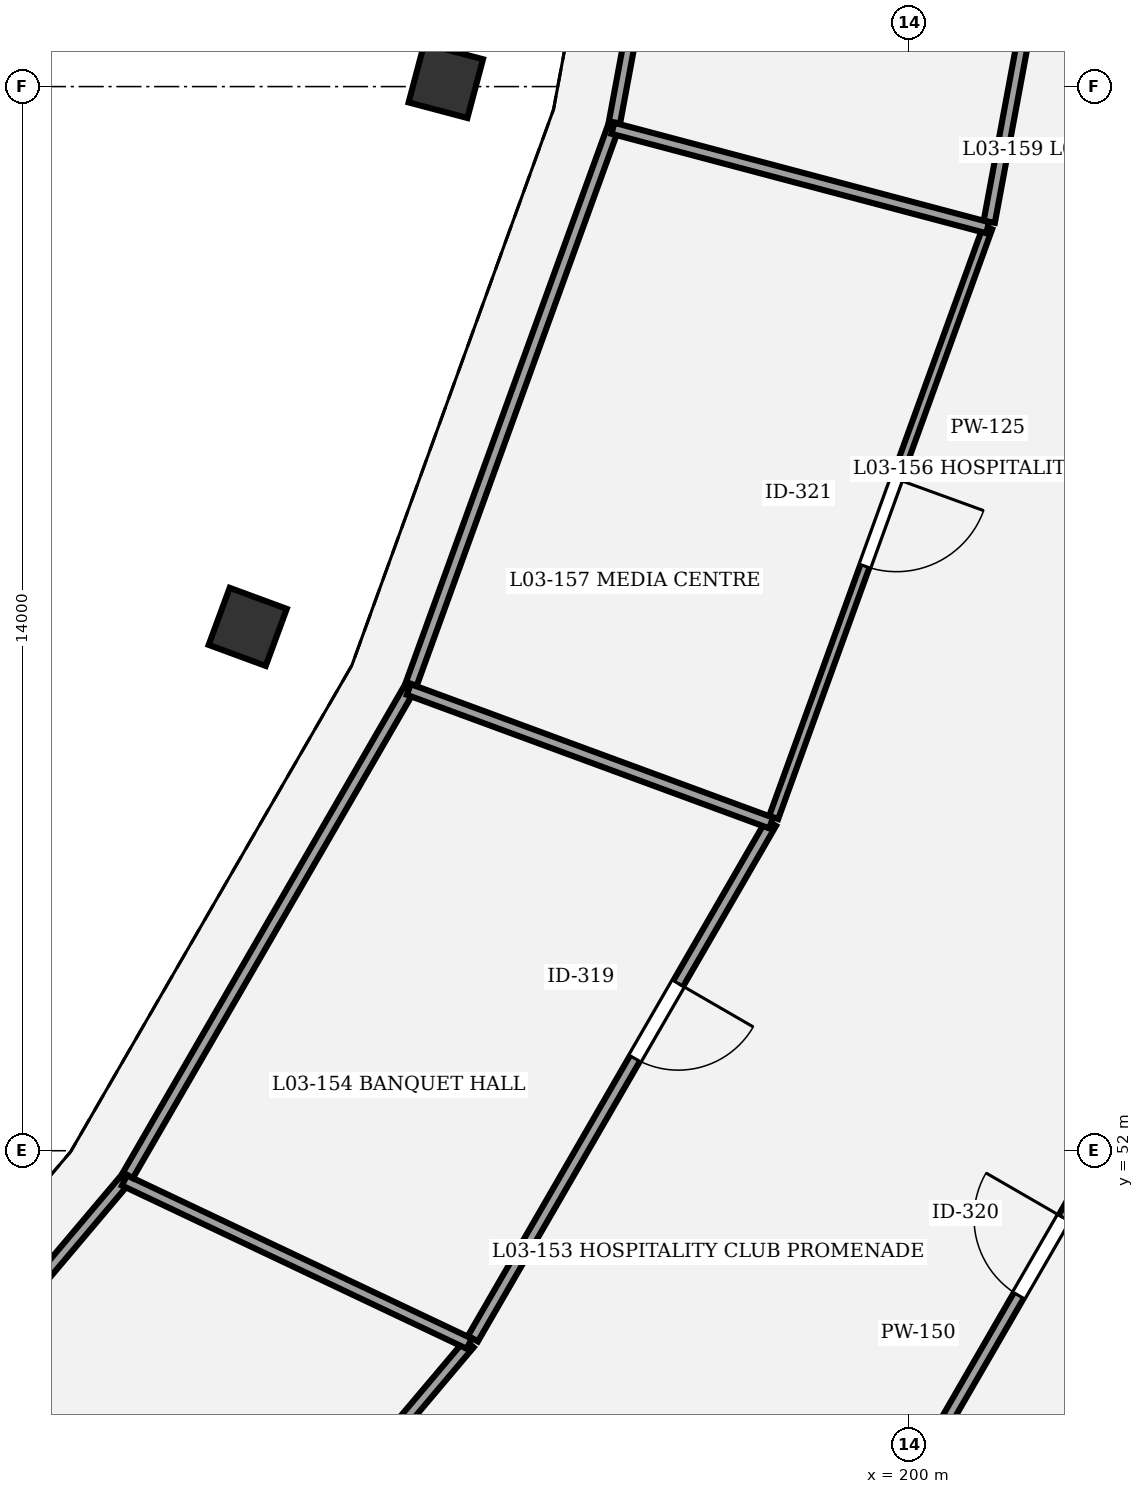
"""IFC4 building model, lengths in metres.
Left out: names, types, materials, properties, quantities, classifications, styles, units other than length and angle.
Written with IfcOpenShell. Run it as: python <this file> out.ifc"""

import sys

from ifc_helpers import new_model, si_unit, direction, frame, frame_2d, origin, origin_2d, place, context, subcontext, project, spatial, rectangle, extrude, element, fill, save


model = new_model("IFC4")
c1 = context("Model", 3, precision=1e-05, world=origin(), true_north=direction((0.0, 1.0)))
c2 = subcontext(c1, "Body", "Model", "MODEL_VIEW")
j1 = project(units=[si_unit("LENGTHUNIT", "METRE"), si_unit("PLANEANGLEUNIT", "RADIAN")], contexts=[c1])
p1 = place(None, origin())
s1 = spatial("IfcSite", under=j1, at=p1, CompositionType="ELEMENT")
p2 = place(p1, origin())
s2 = spatial("IfcBuilding", under=s1, at=p2, CompositionType="ELEMENT")
p3 = place(p2, frame((0.0, 0.0, 14.7)))
s3 = spatial("IfcBuildingStorey", under=s2, at=p3, CompositionType="ELEMENT", Elevation=14.7)
for number, where, z_axis, x_axis in (
    (1, (191.297, 58.892, 0.0), (0.0, 0.0, 1.0), (0.938, -0.346, 0.0)),
    (2, (193.903, 66.076, 0.0), (0.0, 0.0, 1.0), (0.967, -0.256, 0.0)),
):
    element("IfcColumn", number, at=place(p3, frame(where, z_axis=z_axis, x_axis=x_axis)), inside=s3, PredefinedType="COLUMN", context=c2, shape_type="SweptSolid", body=[
        extrude(rectangle(XDim=0.8, YDim=0.8, at=origin_2d()), origin(), (0.0, 0.0, 1.0), 2.85),
    ])
p4 = place(p3, frame((194.212, 49.462, 0.0), z_axis=(0.0, 0.0, 1.0), x_axis=(-0.645180817826, -0.764029915847, 0.0)))
e3 = element("IfcWall", 3, at=p4, inside=s3, PredefinedType="PARTITIONING", context=c2, shape_type="SweptSolid", body=[
    extrude(rectangle(XDim=7.779, YDim=0.15, at=frame_2d((3.89, 0.0))), origin(), (0.0, 0.0, 1.0), 3.25),
])
p5 = place(p4, frame((2.448, 0.0, 0.0)))
e4 = element("IfcOpeningElement", 4, at=p5, cuts=e3, PredefinedType="OPENING", context=c2, shape_type="SweptSolid", body=[
    extrude(rectangle(XDim=1.06, YDim=2.3, at=frame_2d((0.53, 1.15))), frame((0.0, 0.085, 0.0), z_axis=(0.0, -1.0, 0.0), x_axis=(1.0, 0.0, 0.0)), (0.0, 0.0, 1.0), 0.17),
])
p6 = place(p3, frame((198.183, 56.312, 0.0), z_axis=(0.0, 0.0, 1.0), x_axis=(-0.500584301803, -0.865687794063, 0.0)))
e5 = element("IfcWall", 5, at=p6, inside=s3, PredefinedType="PARTITIONING", context=c2, shape_type="SweptSolid", body=[
    extrude(rectangle(XDim=7.837, YDim=0.15, at=frame_2d((3.918, 0.0))), origin(), (0.0, 0.0, 1.0), 3.25),
])
p7 = place(p6, frame((2.44, 0.0, 0.0)))
e6 = element("IfcOpeningElement", 6, at=p7, cuts=e5, PredefinedType="OPENING", context=c2, shape_type="SweptSolid", body=[
    extrude(rectangle(XDim=1.14, YDim=2.3, at=frame_2d((0.57, 1.15))), frame((0.0, 0.085, 0.0), z_axis=(0.0, -1.0, 0.0), x_axis=(1.0, 0.0, 0.0)), (0.0, 0.0, 1.0), 0.17),
])
p8 = place(p3, frame((199.641, 46.981, 0.0), z_axis=(0.0, 0.0, 1.0), x_axis=(0.500559280672, 0.865702262059, 0.0)))
e7 = element("IfcWall", 7, at=p8, inside=s3, PredefinedType="PARTITIONING", context=c2, shape_type="SweptSolid", body=[
    extrude(rectangle(XDim=8.375, YDim=0.15, at=frame_2d((4.187, 0.0))), origin(), (0.0, 0.0, 1.0), 3.25),
])
p9 = place(p8, frame((3.597, 0.0, 0.0)))
e8 = element("IfcOpeningElement", 8, at=p9, cuts=e7, PredefinedType="OPENING", context=c2, shape_type="SweptSolid", body=[
    extrude(rectangle(XDim=1.18, YDim=2.3, at=frame_2d((0.59, 1.15))), frame((0.0, 0.085, 0.0), z_axis=(0.0, -1.0, 0.0), x_axis=(1.0, 0.0, 0.0)), (0.0, 0.0, 1.0), 0.17),
])
p10 = place(p3, frame((201.032, 64.144, 0.0), z_axis=(0.0, 0.0, 1.0), x_axis=(-0.341044733968, -0.940047067669, 0.0)))
e9 = element("IfcWall", 9, at=p10, inside=s3, PredefinedType="PARTITIONING", context=c2, shape_type="SweptSolid", body=[
    extrude(rectangle(XDim=8.254, YDim=0.125, at=frame_2d((4.127, 0.0))), origin(), (0.0, 0.0, 1.0), 3.25),
])
p11 = place(p10, frame((3.517, 0.0, 0.0)))
e10 = element("IfcOpeningElement", 10, at=p11, cuts=e9, PredefinedType="OPENING", context=c2, shape_type="SweptSolid", body=[
    extrude(rectangle(XDim=1.22, YDim=2.3, at=frame_2d((0.61, 1.15))), frame((0.0, 0.073, 0.0), z_axis=(0.0, -1.0, 0.0), x_axis=(1.0, 0.0, 0.0)), (0.0, 0.0, 1.0), 0.145),
])
p12 = place(p3, frame((201.9, 68.777, 0.0), z_axis=(0.0, 0.0, 1.0), x_axis=(-0.182611838257, -0.983185087625, 0.0)))
e11 = element("IfcWall", 11, at=p12, inside=s3, PredefinedType="PARTITIONING", context=c2, shape_type="SweptSolid", body=[
    extrude(rectangle(XDim=4.634, YDim=0.15, at=frame_2d((2.317, 0.0))), origin(), (0.0, 0.0, 1.0), 3.25),
])
p13 = place(p12, frame((0.454, 0.0, 0.0)))
e12 = element("IfcOpeningElement", 12, at=p13, cuts=e11, PredefinedType="OPENING", context=c2, shape_type="SweptSolid", body=[
    extrude(rectangle(XDim=1.32, YDim=2.3, at=frame_2d((0.66, 1.15))), frame((0.0, 0.085, 0.0), z_axis=(0.0, -1.0, 0.0), x_axis=(1.0, 0.0, 0.0)), (0.0, 0.0, 1.0), 0.17),
])
p14 = place(p3, frame((184.946, 46.01, 0.0), z_axis=(0.0, 0.0, 1.0), x_axis=(0.645177360874, 0.764032835038, 0.0)))
e13 = element("IfcWall", 13, at=p14, inside=s3, PredefinedType="PARTITIONING", context=c2, shape_type="SweptSolid", body=[
    extrude(rectangle(XDim=7.329, YDim=0.15, at=frame_2d((3.665, 0.0))), origin(), (0.0, 0.0, 1.0), 3.25),
])
p15 = place(p3, frame((189.675, 51.61, 0.0), z_axis=(0.0, 0.0, 1.0), x_axis=(0.90385861711, -0.427831275476, 0.0)))
e14 = element("IfcWall", 14, at=p15, inside=s3, PredefinedType="PARTITIONING", context=c2, shape_type="SweptSolid", body=[
    extrude(rectangle(XDim=5.02, YDim=0.15, at=frame_2d((2.51, 0.0))), origin(), (0.0, 0.0, 1.0), 3.25),
])
p16 = place(p3, frame((189.721, 51.677, 0.0), z_axis=(0.0, 0.0, 1.0), x_axis=(0.500555224894, 0.865704607144, 0.0)))
e15 = element("IfcWall", 15, at=p16, inside=s3, PredefinedType="PARTITIONING", context=c2, shape_type="SweptSolid", body=[
    extrude(rectangle(XDim=7.383, YDim=0.15, at=frame_2d((3.692, 0.0))), origin(), (0.0, 0.0, 1.0), 3.25),
])
p17 = place(p3, frame((193.417, 58.068, 0.0), z_axis=(0.0, 0.0, 1.0), x_axis=(0.938343937369, -0.345703131607, 0.0)))
e16 = element("IfcWall", 16, at=p17, inside=s3, PredefinedType="PARTITIONING", context=c2, shape_type="SweptSolid", body=[
    extrude(rectangle(XDim=5.08, YDim=0.15, at=frame_2d((2.54, 0.0))), origin(), (0.0, 0.0, 1.0), 3.25),
])
p18 = place(p3, frame((193.45, 58.141, 0.0), z_axis=(0.0, 0.0, 1.0), x_axis=(0.341049747433, 0.940045248792, 0.0)))
e17 = element("IfcWall", 17, at=p18, inside=s3, PredefinedType="PARTITIONING", context=c2, shape_type="SweptSolid", body=[
    extrude(rectangle(XDim=7.776, YDim=0.15, at=frame_2d((3.888, 0.0))), origin(), (0.0, 0.0, 1.0), 3.25),
])
p19 = place(p3, frame((196.102, 65.451, 0.0), z_axis=(0.0, 0.0, 1.0), x_axis=(0.966586731076, -0.256339796576, 0.0)))
e18 = element("IfcWall", 18, at=p19, inside=s3, PredefinedType="PARTITIONING", context=c2, shape_type="SweptSolid", body=[
    extrude(rectangle(XDim=5.101, YDim=0.15, at=frame_2d((2.551, 0.0))), origin(), (0.0, 0.0, 1.0), 3.25),
])
p20 = place(p3, frame((196.123, 65.529, 0.0), z_axis=(0.0, 0.0, 1.0), x_axis=(0.182668726996, 0.983174519695, 0.0)))
e19 = element("IfcWall", 19, at=p20, inside=s3, PredefinedType="PARTITIONING", context=c2, shape_type="SweptSolid", body=[
    extrude(rectangle(XDim=3.304, YDim=0.15, at=frame_2d((1.652, 0.0))), origin(), (0.0, 0.0, 1.0), 3.25),
])
p21 = place(p7, origin())
e20 = element("IfcDoor", 20, at=p21, inside=s3, OperationType="SINGLE_SWING_LEFT", PredefinedType="DOOR", context=c2, shape_type="SweptSolid", body=[
    extrude(rectangle(XDim=1.14, YDim=2.3, at=frame_2d((0.57, 1.15))), frame((0.0, 0.025, 0.0), z_axis=(0.0, -1.0, 0.0), x_axis=(1.0, 0.0, 0.0)), (0.0, 0.0, 1.0), 0.05),
])
fill(e6, e20)
p22 = place(p9, origin())
e21 = element("IfcDoor", 21, at=p22, inside=s3, OperationType="SINGLE_SWING_RIGHT", PredefinedType="DOOR", context=c2, shape_type="SweptSolid", body=[
    extrude(rectangle(XDim=1.18, YDim=2.3, at=frame_2d((0.59, 1.15))), frame((0.0, 0.025, 0.0), z_axis=(0.0, -1.0, 0.0), x_axis=(1.0, 0.0, 0.0)), (0.0, 0.0, 1.0), 0.05),
])
fill(e8, e21)
p23 = place(p11, origin())
e22 = element("IfcDoor", 22, at=p23, inside=s3, OperationType="SINGLE_SWING_LEFT", PredefinedType="DOOR", context=c2, shape_type="SweptSolid", body=[
    extrude(rectangle(XDim=1.22, YDim=2.3, at=frame_2d((0.61, 1.15))), frame((0.0, 0.025, 0.0), z_axis=(0.0, -1.0, 0.0), x_axis=(1.0, 0.0, 0.0)), (0.0, 0.0, 1.0), 0.05),
])
fill(e10, e22)
save(model, sys.argv[1])
